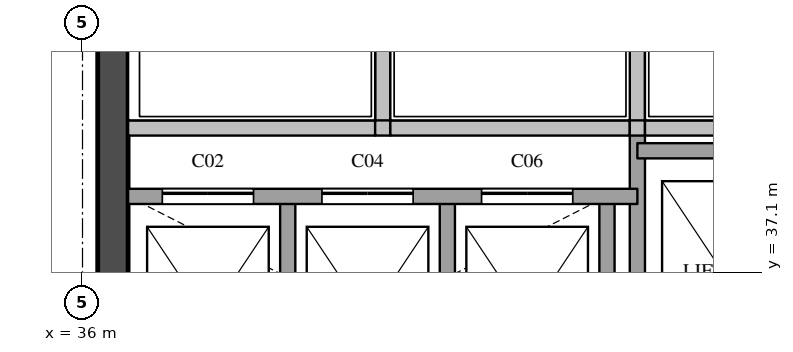
"""IFC4 building model, lengths in metres.
Left out: names, types, materials, properties, quantities, classifications, styles, units other than length and angle.
Written with IfcOpenShell. Run it as: python <this file> out.ifc"""

import sys

from ifc_helpers import new_model, si_unit, direction, frame, frame_2d, origin, place, context, subcontext, project, spatial, rectangle, extrude, element, fill, save


model = new_model("IFC4")
c1 = context("Model", 3, precision=1e-05, world=origin(), true_north=direction((0.0, 1.0)))
c2 = subcontext(c1, "Body", "Model", "MODEL_VIEW")
j1 = project(units=[si_unit("LENGTHUNIT", "METRE"), si_unit("PLANEANGLEUNIT", "RADIAN")], contexts=[c1])
p1 = place(None, origin())
s1 = spatial("IfcSite", under=j1, at=p1, CompositionType="ELEMENT")
p2 = place(p1, origin())
s2 = spatial("IfcBuilding", under=s1, at=p2, CompositionType="ELEMENT")
p3 = place(p2, frame((0.0, 0.0, 242.3)))
s3 = spatial("IfcBuildingStorey", under=s2, at=p3, CompositionType="ELEMENT", Elevation=242.3)
p4 = place(p3, frame((36.4, 29.1, 0.0), z_axis=(0.0, 0.0, 1.0), x_axis=(0.0, 1.0, 0.0)))
e1 = element("IfcWall", 1, at=p4, inside=s3, PredefinedType="SHEAR", context=c2, shape_type="SweptSolid", body=[
    extrude(rectangle(XDim=20.3, YDim=0.4, at=frame_2d((10.15, 0.0))), origin(), (0.0, 0.0, 1.0), 3.6),
])
p5 = place(p4, frame((3.6, 0.0, 0.0)))
e2 = element("IfcOpeningElement", 2, at=p5, cuts=e1, PredefinedType="OPENING", context=c2, shape_type="SweptSolid", body=[
    extrude(rectangle(XDim=1.8, YDim=2.1, at=frame_2d((0.9, 1.05))), frame((0.0, 0.21, 0.0), z_axis=(0.0, -1.0, 0.0), x_axis=(1.0, 0.0, 0.0)), (0.0, 0.0, 1.0), 0.42),
])
p6 = place(p4, frame((16.4, 0.0, 0.0)))
e3 = element("IfcOpeningElement", 3, at=p6, cuts=e1, PredefinedType="OPENING", context=c2, shape_type="SweptSolid", body=[
    extrude(rectangle(XDim=1.0, YDim=2.1, at=frame_2d((0.5, 1.05))), frame((0.0, 0.21, 0.0), z_axis=(0.0, -1.0, 0.0), x_axis=(1.0, 0.0, 0.0)), (0.0, 0.0, 1.0), 0.42),
])
p7 = place(p3, frame((38.7, 34.9, 0.0), z_axis=(0.0, 0.0, 1.0), x_axis=(0.0, 1.0, 0.0)))
e4 = element("IfcWall", 4, at=p7, inside=s3, PredefinedType="SOLIDWALL", context=c2, shape_type="SweptSolid", body=[
    extrude(rectangle(XDim=3.2, YDim=0.2, at=frame_2d((1.6, 0.0))), origin(), (0.0, 0.0, 1.0), 3.6),
])
p8 = place(p3, frame((39.95, 39.0, 0.0), z_axis=(0.0, 0.0, 1.0), x_axis=(0.0, 1.0, 0.0)))
e5 = element("IfcWall", 5, at=p8, inside=s3, PredefinedType="SOLIDWALL", context=c2, shape_type="SweptSolid", body=[
    extrude(rectangle(XDim=1.78, YDim=0.2, at=frame_2d((0.89, 0.0))), origin(), (0.0, 0.0, 1.0), 3.6),
])
for number, where, z_axis, x_axis in (
    (6, (40.8, 34.9, 0.0), (0.0, 0.0, 1.0), (0.0, 1.0, 0.0)),
    (7, (42.9, 34.9, 0.0), (0.0, 0.0, 1.0), (0.0, 1.0, 0.0)),
):
    element("IfcWall", number, at=place(p3, frame(where, z_axis=z_axis, x_axis=x_axis)), inside=s3, PredefinedType="SOLIDWALL", context=c2, shape_type="SweptSolid", body=[
        extrude(rectangle(XDim=3.2, YDim=0.2, at=frame_2d((1.6, 0.0))), origin(), (0.0, 0.0, 1.0), 3.6),
    ])
p9 = place(p3, frame((43.3, 29.1, 0.0), z_axis=(0.0, 0.0, 1.0), x_axis=(0.0, 1.0, 0.0)))
e8 = element("IfcWall", 8, at=p9, inside=s3, PredefinedType="SOLIDWALL", context=c2, shape_type="SweptSolid", body=[
    extrude(rectangle(XDim=9.9, YDim=0.2, at=frame_2d((4.95, 0.0))), origin(), (0.0, 0.0, 1.0), 3.6),
])
p10 = place(p3, frame((43.3, 39.0, 0.0), z_axis=(0.0, 0.0, 1.0), x_axis=(0.0, 1.0, 0.0)))
e9 = element("IfcWall", 9, at=p10, inside=s3, PredefinedType="SOLIDWALL", context=c2, shape_type="SweptSolid", body=[
    extrude(rectangle(XDim=1.78, YDim=0.2, at=frame_2d((0.89, 0.0))), origin(), (0.0, 0.0, 1.0), 3.6),
])
p11 = place(p3, frame((36.6, 38.1, 0.0), z_axis=(0.0, 0.0, 1.0), x_axis=(1.0, 0.0, 0.0)))
e10 = element("IfcWall", 10, at=p11, inside=s3, PredefinedType="SOLIDWALL", context=c2, shape_type="SweptSolid", body=[
    extrude(rectangle(XDim=6.7, YDim=0.2, at=frame_2d((3.35, 0.0))), origin(), (0.0, 0.0, 1.0), 3.6),
])
p12 = place(p11, frame((0.45, 0.0, 0.0)))
e11 = element("IfcOpeningElement", 11, at=p12, cuts=e10, PredefinedType="OPENING", context=c2, shape_type="SweptSolid", body=[
    extrude(rectangle(XDim=1.2, YDim=2.1, at=frame_2d((0.6, 1.05))), frame((0.0, 0.11, 0.0), z_axis=(0.0, -1.0, 0.0), x_axis=(1.0, 0.0, 0.0)), (0.0, 0.0, 1.0), 0.22),
])
p13 = place(p11, frame((2.55, 0.0, 0.0)))
e12 = element("IfcOpeningElement", 12, at=p13, cuts=e10, PredefinedType="OPENING", context=c2, shape_type="SweptSolid", body=[
    extrude(rectangle(XDim=1.2, YDim=2.1, at=frame_2d((0.6, 1.05))), frame((0.0, 0.11, 0.0), z_axis=(0.0, -1.0, 0.0), x_axis=(1.0, 0.0, 0.0)), (0.0, 0.0, 1.0), 0.22),
])
p14 = place(p11, frame((4.65, 0.0, 0.0)))
e13 = element("IfcOpeningElement", 13, at=p14, cuts=e10, PredefinedType="OPENING", context=c2, shape_type="SweptSolid", body=[
    extrude(rectangle(XDim=1.2, YDim=2.1, at=frame_2d((0.6, 1.05))), frame((0.0, 0.11, 0.0), z_axis=(0.0, -1.0, 0.0), x_axis=(1.0, 0.0, 0.0)), (0.0, 0.0, 1.0), 0.22),
])
p15 = place(p3, frame((43.3, 38.7, 0.0), z_axis=(0.0, 0.0, 1.0), x_axis=(1.0, 0.0, 0.0)))
e14 = element("IfcWall", 14, at=p15, inside=s3, PredefinedType="SOLIDWALL", context=c2, shape_type="SweptSolid", body=[
    extrude(rectangle(XDim=4.5, YDim=0.2, at=frame_2d((2.25, 0.0))), origin(), (0.0, 0.0, 1.0), 3.6),
])
p16 = place(p3, frame((36.6, 39.0, 0.0), z_axis=(0.0, 0.0, 1.0), x_axis=(1.0, 0.0, 0.0)))
e15 = element("IfcWall", 15, at=p16, inside=s3, PredefinedType="SOLIDWALL", context=c2, shape_type="SweptSolid", body=[
    extrude(rectangle(XDim=3.25, YDim=0.2, at=frame_2d((1.625, 0.0))), origin(), (0.0, 0.0, 1.0), 3.6),
])
p17 = place(p3, frame((39.85, 39.0, 0.0), z_axis=(0.0, 0.0, 1.0), x_axis=(1.0, 0.0, 0.0)))
e16 = element("IfcWall", 16, at=p17, inside=s3, PredefinedType="SOLIDWALL", context=c2, shape_type="SweptSolid", body=[
    extrude(rectangle(XDim=0.2, YDim=0.2, at=frame_2d((0.1, 0.0))), origin(), (0.0, 0.0, 1.0), 3.6),
])
p18 = place(p3, frame((40.05, 39.0, 0.0), z_axis=(0.0, 0.0, 1.0), x_axis=(1.0, 0.0, 0.0)))
e17 = element("IfcWall", 17, at=p18, inside=s3, PredefinedType="SOLIDWALL", context=c2, shape_type="SweptSolid", body=[
    extrude(rectangle(XDim=3.15, YDim=0.2, at=frame_2d((1.575, 0.0))), origin(), (0.0, 0.0, 1.0), 3.6),
])
p19 = place(p3, frame((43.2, 39.0, 0.0), z_axis=(0.0, 0.0, 1.0), x_axis=(1.0, 0.0, 0.0)))
e18 = element("IfcWall", 18, at=p19, inside=s3, PredefinedType="SOLIDWALL", context=c2, shape_type="SweptSolid", body=[
    extrude(rectangle(XDim=0.2, YDim=0.2, at=frame_2d((0.1, 0.0))), origin(), (0.0, 0.0, 1.0), 3.6),
])
p20 = place(p3, frame((43.4, 39.0, 0.0), z_axis=(0.0, 0.0, 1.0), x_axis=(1.0, 0.0, 0.0)))
e19 = element("IfcWall", 19, at=p20, inside=s3, PredefinedType="SOLIDWALL", context=c2, shape_type="SweptSolid", body=[
    extrude(rectangle(XDim=3.25, YDim=0.2, at=frame_2d((1.625, 0.0))), origin(), (0.0, 0.0, 1.0), 3.6),
])
p21 = place(p12, origin())
e20 = element("IfcDoor", 20, at=p21, inside=s3, OperationType="SLIDING_TO_LEFT", PredefinedType="DOOR", context=c2, shape_type="SweptSolid", body=[
    extrude(rectangle(XDim=1.2, YDim=2.1, at=frame_2d((0.6, 1.05))), frame((0.0, 0.025, 0.0), z_axis=(0.0, -1.0, 0.0), x_axis=(1.0, 0.0, 0.0)), (0.0, 0.0, 1.0), 0.05),
])
fill(e11, e20)
p22 = place(p13, origin())
e21 = element("IfcDoor", 21, at=p22, inside=s3, OperationType="SLIDING_TO_LEFT", PredefinedType="DOOR", context=c2, shape_type="SweptSolid", body=[
    extrude(rectangle(XDim=1.2, YDim=2.1, at=frame_2d((0.6, 1.05))), frame((0.0, 0.025, 0.0), z_axis=(0.0, -1.0, 0.0), x_axis=(1.0, 0.0, 0.0)), (0.0, 0.0, 1.0), 0.05),
])
fill(e12, e21)
p23 = place(p14, origin())
e22 = element("IfcDoor", 22, at=p23, inside=s3, OperationType="SLIDING_TO_LEFT", PredefinedType="DOOR", context=c2, shape_type="SweptSolid", body=[
    extrude(rectangle(XDim=1.2, YDim=2.1, at=frame_2d((0.6, 1.05))), frame((0.0, 0.025, 0.0), z_axis=(0.0, -1.0, 0.0), x_axis=(1.0, 0.0, 0.0)), (0.0, 0.0, 1.0), 0.05),
])
fill(e13, e22)
save(model, sys.argv[1])
